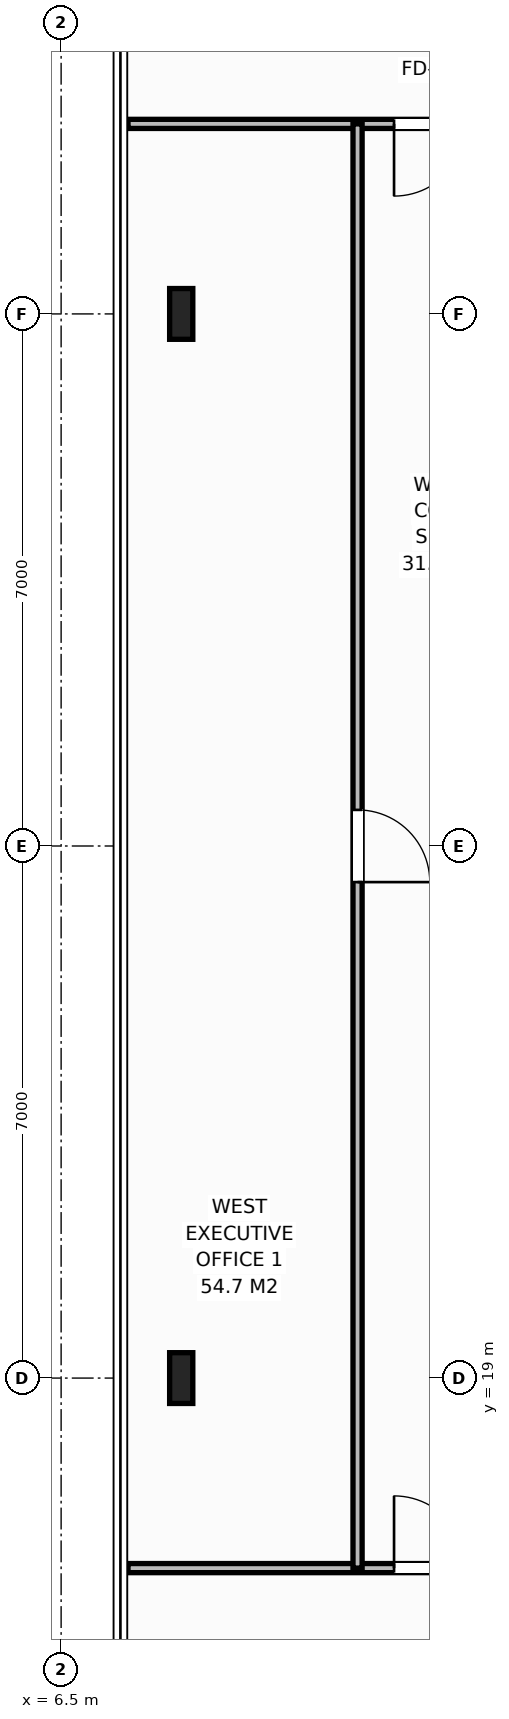
"""IFC4 building model, lengths in metres.
Left out: names, types, materials, properties, quantities, classifications, styles, units other than length and angle.
Written with IfcOpenShell. Run it as: python <this file> out.ifc"""

import sys

from ifc_helpers import new_model, si_unit, direction, frame, frame_2d, origin, origin_2d, place, context, subcontext, project, spatial, rectangle, i_section, extrude, element, fill, save


model = new_model("IFC4")
c1 = context("Model", 3, precision=1e-05, world=origin(), true_north=direction((0.0, 1.0)))
c2 = subcontext(c1, "Body", "Model", "MODEL_VIEW")
j1 = project(units=[si_unit("LENGTHUNIT", "METRE"), si_unit("PLANEANGLEUNIT", "RADIAN")], contexts=[c1])
p1 = place(None, origin())
s1 = spatial("IfcSite", under=j1, at=p1, CompositionType="ELEMENT")
p2 = place(p1, origin())
s2 = spatial("IfcBuilding", under=s1, at=p2, CompositionType="ELEMENT")
p3 = place(p2, frame((0.0, 0.0, 274.6)))
s3 = spatial("IfcBuildingStorey", under=s2, at=p3, CompositionType="ELEMENT", Elevation=274.6)
for number, where, z_axis, x_axis in (
    (1, (8.08, 19.0, 0.0), (0.0, 0.0, 1.0), (1.0, 0.0, 0.0)),
    (2, (8.08, 33.0, 0.0), (0.0, 0.0, 1.0), (1.0, 0.0, 0.0)),
):
    element("IfcColumn", number, at=place(p3, frame(where, z_axis=z_axis, x_axis=x_axis)), inside=s3, PredefinedType="COLUMN", context=c2, shape_type="SweptSolid", body=[
        extrude(i_section(OverallWidth=0.305, OverallDepth=0.668, WebThickness=0.021, FlangeThickness=0.04, at=origin_2d()), origin(), (0.0, 0.0, 1.0), 3.8),
    ])
p4 = place(p3, frame((7.38, 35.5, 0.0), z_axis=(0.0, 0.0, 1.0), x_axis=(1.0, 0.0, 0.0)))
e3 = element("IfcWall", 3, at=p4, inside=s3, PredefinedType="PARTITIONING", context=c2, shape_type="SweptSolid", body=[
    extrude(rectangle(XDim=10.177, YDim=0.12, at=frame_2d((5.089, 0.0))), origin(), (0.0, 0.0, 1.0), 3.588),
])
p5 = place(p4, frame((3.5, 0.0, 0.0)))
e4 = element("IfcOpeningElement", 4, at=p5, cuts=e3, PredefinedType="OPENING", context=c2, shape_type="SweptSolid", body=[
    extrude(rectangle(XDim=0.95, YDim=2.15, at=frame_2d((0.475, 1.075))), frame((0.0, 0.07, 0.0), z_axis=(0.0, -1.0, 0.0), x_axis=(1.0, 0.0, 0.0)), (0.0, 0.0, 1.0), 0.14),
])
p6 = place(p3, frame((7.38, 16.5, 0.0), z_axis=(0.0, 0.0, 1.0), x_axis=(1.0, 0.0, 0.0)))
e5 = element("IfcWall", 5, at=p6, inside=s3, PredefinedType="PARTITIONING", context=c2, shape_type="SweptSolid", body=[
    extrude(rectangle(XDim=5.76, YDim=0.12, at=frame_2d((2.88, 0.0))), origin(), (0.0, 0.0, 1.0), 3.588),
])
p7 = place(p6, frame((3.5, 0.0, 0.0)))
e6 = element("IfcOpeningElement", 6, at=p7, cuts=e5, PredefinedType="OPENING", context=c2, shape_type="SweptSolid", body=[
    extrude(rectangle(XDim=0.95, YDim=2.15, at=frame_2d((0.475, 1.075))), frame((0.0, 0.07, 0.0), z_axis=(0.0, -1.0, 0.0), x_axis=(1.0, 0.0, 0.0)), (0.0, 0.0, 1.0), 0.14),
])
p8 = place(p3, frame((10.4, 16.5, 0.0), z_axis=(0.0, 0.0, 1.0), x_axis=(0.0, 1.0, 0.0)))
e7 = element("IfcWall", 7, at=p8, inside=s3, PredefinedType="PARTITIONING", context=c2, shape_type="SweptSolid", body=[
    extrude(rectangle(XDim=19.0, YDim=0.12, at=frame_2d((9.5, 0.0))), origin(), (0.0, 0.0, 1.0), 3.588),
])
p9 = place(p8, frame((9.025, 0.0, 0.0)))
e8 = element("IfcOpeningElement", 8, at=p9, cuts=e7, PredefinedType="OPENING", context=c2, shape_type="SweptSolid", body=[
    extrude(rectangle(XDim=0.95, YDim=2.15, at=frame_2d((0.475, 1.075))), frame((0.0, 0.07, 0.0), z_axis=(0.0, -1.0, 0.0), x_axis=(1.0, 0.0, 0.0)), (0.0, 0.0, 1.0), 0.14),
])
p10 = place(p5, origin())
e9 = element("IfcDoor", 9, at=p10, inside=s3, OperationType="SINGLE_SWING_RIGHT", PredefinedType="DOOR", context=c2, shape_type="SweptSolid", body=[
    extrude(rectangle(XDim=0.95, YDim=2.15, at=frame_2d((0.475, 1.075))), frame((0.0, 0.025, 0.0), z_axis=(0.0, -1.0, 0.0), x_axis=(1.0, 0.0, 0.0)), (0.0, 0.0, 1.0), 0.05),
])
fill(e4, e9)
p11 = place(p7, origin())
e10 = element("IfcDoor", 10, at=p11, inside=s3, OperationType="SINGLE_SWING_LEFT", PredefinedType="DOOR", context=c2, shape_type="SweptSolid", body=[
    extrude(rectangle(XDim=0.95, YDim=2.15, at=frame_2d((0.475, 1.075))), frame((0.0, 0.025, 0.0), z_axis=(0.0, -1.0, 0.0), x_axis=(1.0, 0.0, 0.0)), (0.0, 0.0, 1.0), 0.05),
])
fill(e6, e10)
p12 = place(p9, origin())
e11 = element("IfcDoor", 11, at=p12, inside=s3, OperationType="SINGLE_SWING_RIGHT", PredefinedType="DOOR", context=c2, shape_type="SweptSolid", body=[
    extrude(rectangle(XDim=0.95, YDim=2.15, at=frame_2d((0.475, 1.075))), frame((0.0, 0.025, 0.0), z_axis=(0.0, -1.0, 0.0), x_axis=(1.0, 0.0, 0.0)), (0.0, 0.0, 1.0), 0.05),
])
fill(e8, e11)
save(model, sys.argv[1])
